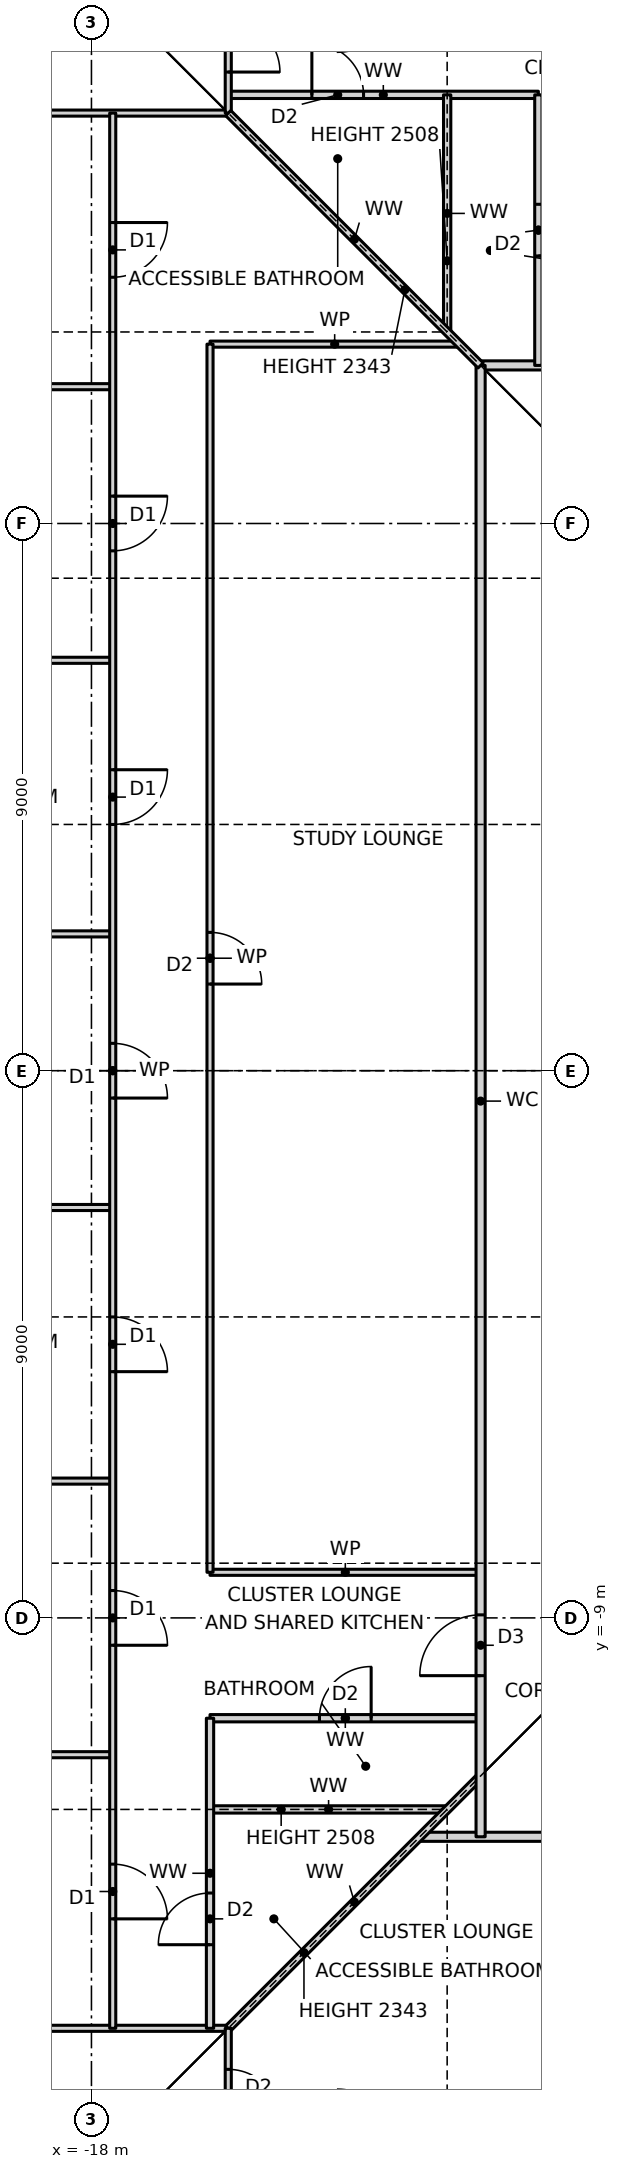
"""IFC4 building model, lengths in metres.
Left out: names, types, materials, properties, quantities, classifications, styles, units other than length and angle.
Written with IfcOpenShell. Run it as: python <this file> out.ifc"""

import sys

from ifc_helpers import new_model, si_unit, direction, frame, frame_2d, origin, place, context, subcontext, project, spatial, rectangle, extrude, element, fill, save


model = new_model("IFC4")
c1 = context("Model", 3, precision=1e-05, world=origin(), true_north=direction((0.0, 1.0)))
c2 = subcontext(c1, "Body", "Model", "MODEL_VIEW")
j1 = project(units=[si_unit("LENGTHUNIT", "METRE"), si_unit("PLANEANGLEUNIT", "RADIAN")], contexts=[c1])
p1 = place(None, origin())
s1 = spatial("IfcSite", under=j1, at=p1, CompositionType="ELEMENT")
p2 = place(p1, origin())
s2 = spatial("IfcBuilding", under=s1, at=p2, CompositionType="ELEMENT")
p3 = place(p2, frame((0.0, 0.0, 22.0)))
s3 = spatial("IfcBuildingStorey", under=s2, at=p3, CompositionType="ELEMENT", Elevation=22.0)
p4 = place(p3, frame((-23.19, -15.75, 0.0), z_axis=(0.0, 0.0, 1.0), x_axis=(1.0, 0.0, 0.0)))
e1 = element("IfcWall", 1, at=p4, inside=s3, PredefinedType="PARTITIONING", context=c2, shape_type="SweptSolid", body=[
    extrude(rectangle(XDim=7.44, YDim=0.1, at=frame_2d((3.72, 0.0))), origin(), (0.0, 0.0, 1.0), 3.27),
])
p5 = place(p3, frame((-12.6, -12.6, 0.0), z_axis=(0.0, 0.0, 1.0), x_axis=(1.0, 0.0, 0.0)))
e2 = element("IfcWall", 2, at=p5, inside=s3, PredefinedType="PARTITIONING", context=c2, shape_type="SweptSolid", body=[
    extrude(rectangle(XDim=25.2, YDim=0.15, at=frame_2d((12.6, 0.0))), origin(), (0.0, 0.0, 1.0), 3.27),
])
p6 = place(p5, frame((21.05, 0.0, 0.0)))
e3 = element("IfcOpeningElement", 3, at=p6, cuts=e2, PredefinedType="OPENING", context=c2, shape_type="SweptSolid", body=[
    extrude(rectangle(XDim=1.0, YDim=2.1, at=frame_2d((0.5, 1.05))), frame((0.0, 0.085, 0.0), z_axis=(0.0, -1.0, 0.0), x_axis=(1.0, 0.0, 0.0)), (0.0, 0.0, 1.0), 0.17),
])
p7 = place(p3, frame((-16.05, -12.15, 0.0), z_axis=(0.0, 0.0, 1.0), x_axis=(1.0, 0.0, 0.0)))
e4 = element("IfcWall", 4, at=p7, inside=s3, PredefinedType="PARTITIONING", context=c2, shape_type="SweptSolid", body=[
    extrude(rectangle(XDim=3.9, YDim=0.12, at=frame_2d((1.95, 0.0))), origin(), (0.0, 0.0, 1.0), 2.508),
])
p8 = place(p3, frame((-23.19, -11.25, 0.0), z_axis=(0.0, 0.0, 1.0), x_axis=(1.0, 0.0, 0.0)))
e5 = element("IfcWall", 5, at=p8, inside=s3, PredefinedType="PARTITIONING", context=c2, shape_type="SweptSolid", body=[
    extrude(rectangle(XDim=5.54, YDim=0.1, at=frame_2d((2.77, 0.0))), origin(), (0.0, 0.0, 1.0), 3.27),
])
p9 = place(p3, frame((-16.05, -10.65, 0.0), z_axis=(0.0, 0.0, 1.0), x_axis=(1.0, 0.0, 0.0)))
e6 = element("IfcWall", 6, at=p9, inside=s3, PredefinedType="PARTITIONING", context=c2, shape_type="SweptSolid", body=[
    extrude(rectangle(XDim=4.45, YDim=0.12, at=frame_2d((2.225, 0.0))), origin(), (0.0, 0.0, 1.0), 3.27),
])
p10 = place(p9, frame((1.8, 0.0, 0.0)))
e7 = element("IfcOpeningElement", 7, at=p10, cuts=e6, PredefinedType="OPENING", context=c2, shape_type="SweptSolid", body=[
    extrude(rectangle(XDim=0.85, YDim=2.1, at=frame_2d((0.425, 1.05))), frame((0.0, 0.07, 0.0), z_axis=(0.0, -1.0, 0.0), x_axis=(1.0, 0.0, 0.0)), (0.0, 0.0, 1.0), 0.14),
])
p11 = place(p3, frame((-16.05, -8.25, 0.0), z_axis=(0.0, 0.0, 1.0), x_axis=(1.0, 0.0, 0.0)))
e8 = element("IfcWall", 8, at=p11, inside=s3, PredefinedType="PARTITIONING", context=c2, shape_type="SweptSolid", body=[
    extrude(rectangle(XDim=4.45, YDim=0.1, at=frame_2d((2.225, 0.0))), origin(), (0.0, 0.0, 1.0), 3.27),
])
for number, where, z_axis, x_axis in (
    (9, (-23.19, -6.75, 0.0), (0.0, 0.0, 1.0), (1.0, 0.0, 0.0)),
    (10, (-23.19, -2.25, 0.0), (0.0, 0.0, 1.0), (1.0, 0.0, 0.0)),
    (11, (-23.19, 2.25, 0.0), (0.0, 0.0, 1.0), (1.0, 0.0, 0.0)),
    (12, (-23.19, 6.75, 0.0), (0.0, 0.0, 1.0), (1.0, 0.0, 0.0)),
    (13, (-23.19, 11.25, 0.0), (0.0, 0.0, 1.0), (1.0, 0.0, 0.0)),
):
    element("IfcWall", number, at=place(p3, frame(where, z_axis=z_axis, x_axis=x_axis)), inside=s3, PredefinedType="PARTITIONING", context=c2, shape_type="SweptSolid", body=[
        extrude(rectangle(XDim=5.54, YDim=0.1, at=frame_2d((2.77, 0.0))), origin(), (0.0, 0.0, 1.0), 3.27),
    ])
p12 = place(p3, frame((-11.6, 11.6, 0.0), z_axis=(0.0, 0.0, 1.0), x_axis=(1.0, 0.0, 0.0)))
e14 = element("IfcWall", 14, at=p12, inside=s3, PredefinedType="PARTITIONING", context=c2, shape_type="SweptSolid", body=[
    extrude(rectangle(XDim=23.2, YDim=0.15, at=frame_2d((11.6, 0.0))), origin(), (0.0, 0.0, 1.0), 3.27),
])
p13 = place(p12, frame((1.65, 0.0, 0.0)))
e15 = element("IfcOpeningElement", 15, at=p13, cuts=e14, PredefinedType="OPENING", context=c2, shape_type="SweptSolid", body=[
    extrude(rectangle(XDim=1.0, YDim=2.1, at=frame_2d((0.5, 1.05))), frame((0.0, 0.085, 0.0), z_axis=(0.0, -1.0, 0.0), x_axis=(1.0, 0.0, 0.0)), (0.0, 0.0, 1.0), 0.17),
])
p14 = place(p3, frame((-16.05, 11.95, 0.0), z_axis=(0.0, 0.0, 1.0), x_axis=(1.0, 0.0, 0.0)))
e16 = element("IfcWall", 16, at=p14, inside=s3, PredefinedType="PARTITIONING", context=c2, shape_type="SweptSolid", body=[
    extrude(rectangle(XDim=4.1, YDim=0.1, at=frame_2d((2.05, 0.0))), origin(), (0.0, 0.0, 1.0), 3.27),
])
p15 = place(p3, frame((-23.19, 15.75, 0.0), z_axis=(0.0, 0.0, 1.0), x_axis=(1.0, 0.0, 0.0)))
e17 = element("IfcWall", 17, at=p15, inside=s3, PredefinedType="PARTITIONING", context=c2, shape_type="SweptSolid", body=[
    extrude(rectangle(XDim=7.44, YDim=0.1, at=frame_2d((3.72, 0.0))), origin(), (0.0, 0.0, 1.0), 3.27),
])
p16 = place(p3, frame((-15.75, 16.05, 0.0), z_axis=(0.0, 0.0, 1.0), x_axis=(1.0, 0.0, 0.0)))
e18 = element("IfcWall", 18, at=p16, inside=s3, PredefinedType="PARTITIONING", context=c2, shape_type="SweptSolid", body=[
    extrude(rectangle(XDim=5.1, YDim=0.12, at=frame_2d((2.55, 0.0))), origin(), (0.0, 0.0, 1.0), 3.27),
])
p17 = place(p16, frame((1.375, 0.0, 0.0)))
e19 = element("IfcOpeningElement", 19, at=p17, cuts=e18, PredefinedType="OPENING", context=c2, shape_type="SweptSolid", body=[
    extrude(rectangle(XDim=0.85, YDim=2.1, at=frame_2d((0.425, 1.05))), frame((0.0, 0.07, 0.0), z_axis=(0.0, -1.0, 0.0), x_axis=(1.0, 0.0, 0.0)), (0.0, 0.0, 1.0), 0.14),
])
p18 = place(p3, frame((-15.75, -15.75, 0.0), z_axis=(0.0, 0.0, 1.0), x_axis=(0.707106781187, 0.707106781187, 0.0)))
e20 = element("IfcWall", 20, at=p18, inside=s3, PredefinedType="PARTITIONING", context=c2, shape_type="SweptSolid", body=[
    extrude(rectangle(XDim=5.869, YDim=0.12, at=frame_2d((2.935, 0.0))), origin(), (0.0, 0.0, 1.0), 2.343),
])
p19 = place(p3, frame((-10.65, 11.6, 0.0), z_axis=(0.0, 0.0, 1.0), x_axis=(0.0, 1.0, 0.0)))
e21 = element("IfcWall", 21, at=p19, inside=s3, PredefinedType="PARTITIONING", context=c2, shape_type="SweptSolid", body=[
    extrude(rectangle(XDim=4.45, YDim=0.12, at=frame_2d((2.225, 0.0))), origin(), (0.0, 0.0, 1.0), 3.27),
])
p20 = place(p19, frame((1.8, 0.0, 0.0)))
e22 = element("IfcOpeningElement", 22, at=p20, cuts=e21, PredefinedType="OPENING", context=c2, shape_type="SweptSolid", body=[
    extrude(rectangle(XDim=0.85, YDim=2.1, at=frame_2d((0.425, 1.05))), frame((0.0, 0.07, 0.0), z_axis=(0.0, -1.0, 0.0), x_axis=(1.0, 0.0, 0.0)), (0.0, 0.0, 1.0), 0.14),
])
p21 = place(p3, frame((-11.6, -12.6, 0.0), z_axis=(0.0, 0.0, 1.0), x_axis=(0.0, 1.0, 0.0)))
e23 = element("IfcWall", 23, at=p21, inside=s3, PredefinedType="PARTITIONING", context=c2, shape_type="SweptSolid", body=[
    extrude(rectangle(XDim=24.2, YDim=0.15, at=frame_2d((12.1, 0.0))), origin(), (0.0, 0.0, 1.0), 3.27),
])
p22 = place(p21, frame((2.65, 0.0, 0.0)))
e24 = element("IfcOpeningElement", 24, at=p22, cuts=e23, PredefinedType="OPENING", context=c2, shape_type="SweptSolid", body=[
    extrude(rectangle(XDim=1.0, YDim=2.1, at=frame_2d((0.5, 1.05))), frame((0.0, 0.085, 0.0), z_axis=(0.0, -1.0, 0.0), x_axis=(1.0, 0.0, 0.0)), (0.0, 0.0, 1.0), 0.17),
])
p23 = place(p3, frame((-12.15, 12.15, 0.0), z_axis=(0.0, 0.0, 1.0), x_axis=(0.0, 1.0, 0.0)))
e25 = element("IfcWall", 25, at=p23, inside=s3, PredefinedType="PARTITIONING", context=c2, shape_type="SweptSolid", body=[
    extrude(rectangle(XDim=3.9, YDim=0.12, at=frame_2d((1.95, 0.0))), origin(), (0.0, 0.0, 1.0), 2.508),
])
p24 = place(p3, frame((-15.75, -23.19, 0.0), z_axis=(0.0, 0.0, 1.0), x_axis=(0.0, 1.0, 0.0)))
e26 = element("IfcWall", 26, at=p24, inside=s3, PredefinedType="PARTITIONING", context=c2, shape_type="SweptSolid", body=[
    extrude(rectangle(XDim=7.44, YDim=0.1, at=frame_2d((3.72, 0.0))), origin(), (0.0, 0.0, 1.0), 3.27),
])
p25 = place(p24, frame((5.915, 0.0, 0.0)))
e27 = element("IfcOpeningElement", 27, at=p25, cuts=e26, PredefinedType="OPENING", context=c2, shape_type="SweptSolid", body=[
    extrude(rectangle(XDim=0.85, YDim=2.1, at=frame_2d((0.425, 1.05))), frame((0.0, 0.06, 0.0), z_axis=(0.0, -1.0, 0.0), x_axis=(1.0, 0.0, 0.0)), (0.0, 0.0, 1.0), 0.12),
])
p26 = place(p3, frame((-15.75, 15.75, 0.0), z_axis=(0.0, 0.0, 1.0), x_axis=(0.0, 1.0, 0.0)))
e28 = element("IfcWall", 28, at=p26, inside=s3, PredefinedType="PARTITIONING", context=c2, shape_type="SweptSolid", body=[
    extrude(rectangle(XDim=7.44, YDim=0.1, at=frame_2d((3.72, 0.0))), origin(), (0.0, 0.0, 1.0), 3.27),
])
p27 = place(p26, frame((0.675, 0.0, 0.0)))
e29 = element("IfcOpeningElement", 29, at=p27, cuts=e28, PredefinedType="OPENING", context=c2, shape_type="SweptSolid", body=[
    extrude(rectangle(XDim=0.85, YDim=2.1, at=frame_2d((0.425, 1.05))), frame((0.0, 0.06, 0.0), z_axis=(0.0, -1.0, 0.0), x_axis=(1.0, 0.0, 0.0)), (0.0, 0.0, 1.0), 0.12),
])
p28 = place(p3, frame((-16.05, -15.75, 0.0), z_axis=(0.0, 0.0, 1.0), x_axis=(0.0, 1.0, 0.0)))
e30 = element("IfcWall", 30, at=p28, inside=s3, PredefinedType="PARTITIONING", context=c2, shape_type="SweptSolid", body=[
    extrude(rectangle(XDim=5.1, YDim=0.12, at=frame_2d((2.55, 0.0))), origin(), (0.0, 0.0, 1.0), 3.27),
])
p29 = place(p28, frame((1.375, 0.0, 0.0)))
e31 = element("IfcOpeningElement", 31, at=p29, cuts=e30, PredefinedType="OPENING", context=c2, shape_type="SweptSolid", body=[
    extrude(rectangle(XDim=0.85, YDim=2.1, at=frame_2d((0.425, 1.05))), frame((0.0, 0.07, 0.0), z_axis=(0.0, -1.0, 0.0), x_axis=(1.0, 0.0, 0.0)), (0.0, 0.0, 1.0), 0.14),
])
p30 = place(p3, frame((-16.05, -8.25, 0.0), z_axis=(0.0, 0.0, 1.0), x_axis=(0.0, 1.0, 0.0)))
e32 = element("IfcWall", 32, at=p30, inside=s3, PredefinedType="PARTITIONING", context=c2, shape_type="SweptSolid", body=[
    extrude(rectangle(XDim=20.2, YDim=0.1, at=frame_2d((10.1, 0.0))), origin(), (0.0, 0.0, 1.0), 3.27),
])
p31 = place(p30, frame((9.675, 0.0, 0.0)))
e33 = element("IfcOpeningElement", 33, at=p31, cuts=e32, PredefinedType="OPENING", context=c2, shape_type="SweptSolid", body=[
    extrude(rectangle(XDim=0.85, YDim=2.1, at=frame_2d((0.425, 1.05))), frame((0.0, 0.06, 0.0), z_axis=(0.0, -1.0, 0.0), x_axis=(1.0, 0.0, 0.0)), (0.0, 0.0, 1.0), 0.12),
])
p32 = place(p3, frame((-17.65, -15.75, 0.0), z_axis=(0.0, 0.0, 1.0), x_axis=(0.0, 1.0, 0.0)))
e34 = element("IfcWall", 34, at=p32, inside=s3, PredefinedType="PARTITIONING", context=c2, shape_type="SweptSolid", body=[
    extrude(rectangle(XDim=31.5, YDim=0.1, at=frame_2d((15.75, 0.0))), origin(), (0.0, 0.0, 1.0), 3.27),
])
p33 = place(p32, frame((28.8, 0.0, 0.0)))
e35 = element("IfcOpeningElement", 35, at=p33, cuts=e34, PredefinedType="OPENING", context=c2, shape_type="SweptSolid", body=[
    extrude(rectangle(XDim=0.9, YDim=2.1, at=frame_2d((0.45, 1.05))), frame((0.0, 0.06, 0.0), z_axis=(0.0, -1.0, 0.0), x_axis=(1.0, 0.0, 0.0)), (0.0, 0.0, 1.0), 0.12),
])
p34 = place(p32, frame((24.3, 0.0, 0.0)))
e36 = element("IfcOpeningElement", 36, at=p34, cuts=e34, PredefinedType="OPENING", context=c2, shape_type="SweptSolid", body=[
    extrude(rectangle(XDim=0.9, YDim=2.1, at=frame_2d((0.45, 1.05))), frame((0.0, 0.06, 0.0), z_axis=(0.0, -1.0, 0.0), x_axis=(1.0, 0.0, 0.0)), (0.0, 0.0, 1.0), 0.12),
])
p35 = place(p32, frame((19.8, 0.0, 0.0)))
e37 = element("IfcOpeningElement", 37, at=p35, cuts=e34, PredefinedType="OPENING", context=c2, shape_type="SweptSolid", body=[
    extrude(rectangle(XDim=0.9, YDim=2.1, at=frame_2d((0.45, 1.05))), frame((0.0, 0.06, 0.0), z_axis=(0.0, -1.0, 0.0), x_axis=(1.0, 0.0, 0.0)), (0.0, 0.0, 1.0), 0.12),
])
p36 = place(p32, frame((15.3, 0.0, 0.0)))
e38 = element("IfcOpeningElement", 38, at=p36, cuts=e34, PredefinedType="OPENING", context=c2, shape_type="SweptSolid", body=[
    extrude(rectangle(XDim=0.9, YDim=2.1, at=frame_2d((0.45, 1.05))), frame((0.0, 0.06, 0.0), z_axis=(0.0, -1.0, 0.0), x_axis=(1.0, 0.0, 0.0)), (0.0, 0.0, 1.0), 0.12),
])
p37 = place(p32, frame((10.8, 0.0, 0.0)))
e39 = element("IfcOpeningElement", 39, at=p37, cuts=e34, PredefinedType="OPENING", context=c2, shape_type="SweptSolid", body=[
    extrude(rectangle(XDim=0.9, YDim=2.1, at=frame_2d((0.45, 1.05))), frame((0.0, 0.06, 0.0), z_axis=(0.0, -1.0, 0.0), x_axis=(1.0, 0.0, 0.0)), (0.0, 0.0, 1.0), 0.12),
])
p38 = place(p32, frame((6.3, 0.0, 0.0)))
e40 = element("IfcOpeningElement", 40, at=p38, cuts=e34, PredefinedType="OPENING", context=c2, shape_type="SweptSolid", body=[
    extrude(rectangle(XDim=0.9, YDim=2.1, at=frame_2d((0.45, 1.05))), frame((0.0, 0.06, 0.0), z_axis=(0.0, -1.0, 0.0), x_axis=(1.0, 0.0, 0.0)), (0.0, 0.0, 1.0), 0.12),
])
p39 = place(p32, frame((1.8, 0.0, 0.0)))
e41 = element("IfcOpeningElement", 41, at=p39, cuts=e34, PredefinedType="OPENING", context=c2, shape_type="SweptSolid", body=[
    extrude(rectangle(XDim=0.9, YDim=2.1, at=frame_2d((0.45, 1.05))), frame((0.0, 0.06, 0.0), z_axis=(0.0, -1.0, 0.0), x_axis=(1.0, 0.0, 0.0)), (0.0, 0.0, 1.0), 0.12),
])
p40 = place(p3, frame((-11.6, 11.6, 0.0), z_axis=(0.0, 0.0, 1.0), x_axis=(-0.707106781187, 0.707106781187, 0.0)))
e42 = element("IfcWall", 42, at=p40, inside=s3, PredefinedType="PARTITIONING", context=c2, shape_type="SweptSolid", body=[
    extrude(rectangle(XDim=5.869, YDim=0.12, at=frame_2d((2.935, 0.0))), origin(), (0.0, 0.0, 1.0), 2.343),
])
p41 = place(p20, frame((0.85, 0.0, 0.0), z_axis=(0.0, 0.0, 1.0), x_axis=(-1.0, 0.0, 0.0)))
e43 = element("IfcDoor", 43, at=p41, inside=s3, OperationType="SINGLE_SWING_RIGHT", PredefinedType="DOOR", context=c2, shape_type="SweptSolid", body=[
    extrude(rectangle(XDim=0.85, YDim=2.1, at=frame_2d((0.425, 1.05))), frame((0.0, 0.025, 0.0), z_axis=(0.0, -1.0, 0.0), x_axis=(1.0, 0.0, 0.0)), (0.0, 0.0, 1.0), 0.05),
])
fill(e22, e43)
p42 = place(p17, origin())
e44 = element("IfcDoor", 44, at=p42, inside=s3, OperationType="SINGLE_SWING_LEFT", PredefinedType="DOOR", context=c2, shape_type="SweptSolid", body=[
    extrude(rectangle(XDim=0.85, YDim=2.1, at=frame_2d((0.425, 1.05))), frame((0.0, 0.025, 0.0), z_axis=(0.0, -1.0, 0.0), x_axis=(1.0, 0.0, 0.0)), (0.0, 0.0, 1.0), 0.05),
])
fill(e19, e44)
p43 = place(p33, frame((0.9, 0.0, 0.0), z_axis=(0.0, 0.0, 1.0), x_axis=(-1.0, 0.0, 0.0)))
e45 = element("IfcDoor", 45, at=p43, inside=s3, OperationType="SINGLE_SWING_LEFT", PredefinedType="DOOR", context=c2, shape_type="SweptSolid", body=[
    extrude(rectangle(XDim=0.9, YDim=2.1, at=frame_2d((0.45, 1.05))), frame((0.0, 0.025, 0.0), z_axis=(0.0, -1.0, 0.0), x_axis=(1.0, 0.0, 0.0)), (0.0, 0.0, 1.0), 0.05),
])
fill(e35, e45)
p44 = place(p34, frame((0.9, 0.0, 0.0), z_axis=(0.0, 0.0, 1.0), x_axis=(-1.0, 0.0, 0.0)))
e46 = element("IfcDoor", 46, at=p44, inside=s3, OperationType="SINGLE_SWING_LEFT", PredefinedType="DOOR", context=c2, shape_type="SweptSolid", body=[
    extrude(rectangle(XDim=0.9, YDim=2.1, at=frame_2d((0.45, 1.05))), frame((0.0, 0.025, 0.0), z_axis=(0.0, -1.0, 0.0), x_axis=(1.0, 0.0, 0.0)), (0.0, 0.0, 1.0), 0.05),
])
fill(e36, e46)
p45 = place(p35, frame((0.9, 0.0, 0.0), z_axis=(0.0, 0.0, 1.0), x_axis=(-1.0, 0.0, 0.0)))
e47 = element("IfcDoor", 47, at=p45, inside=s3, OperationType="SINGLE_SWING_LEFT", PredefinedType="DOOR", context=c2, shape_type="SweptSolid", body=[
    extrude(rectangle(XDim=0.9, YDim=2.1, at=frame_2d((0.45, 1.05))), frame((0.0, 0.025, 0.0), z_axis=(0.0, -1.0, 0.0), x_axis=(1.0, 0.0, 0.0)), (0.0, 0.0, 1.0), 0.05),
])
fill(e37, e47)
p46 = place(p36, frame((0.9, 0.0, 0.0), z_axis=(0.0, 0.0, 1.0), x_axis=(-1.0, 0.0, 0.0)))
e48 = element("IfcDoor", 48, at=p46, inside=s3, OperationType="SINGLE_SWING_RIGHT", PredefinedType="DOOR", context=c2, shape_type="SweptSolid", body=[
    extrude(rectangle(XDim=0.9, YDim=2.1, at=frame_2d((0.45, 1.05))), frame((0.0, 0.025, 0.0), z_axis=(0.0, -1.0, 0.0), x_axis=(1.0, 0.0, 0.0)), (0.0, 0.0, 1.0), 0.05),
])
fill(e38, e48)
p47 = place(p37, frame((0.9, 0.0, 0.0), z_axis=(0.0, 0.0, 1.0), x_axis=(-1.0, 0.0, 0.0)))
e49 = element("IfcDoor", 49, at=p47, inside=s3, OperationType="SINGLE_SWING_RIGHT", PredefinedType="DOOR", context=c2, shape_type="SweptSolid", body=[
    extrude(rectangle(XDim=0.9, YDim=2.1, at=frame_2d((0.45, 1.05))), frame((0.0, 0.025, 0.0), z_axis=(0.0, -1.0, 0.0), x_axis=(1.0, 0.0, 0.0)), (0.0, 0.0, 1.0), 0.05),
])
fill(e39, e49)
p48 = place(p38, frame((0.9, 0.0, 0.0), z_axis=(0.0, 0.0, 1.0), x_axis=(-1.0, 0.0, 0.0)))
e50 = element("IfcDoor", 50, at=p48, inside=s3, OperationType="SINGLE_SWING_RIGHT", PredefinedType="DOOR", context=c2, shape_type="SweptSolid", body=[
    extrude(rectangle(XDim=0.9, YDim=2.1, at=frame_2d((0.45, 1.05))), frame((0.0, 0.025, 0.0), z_axis=(0.0, -1.0, 0.0), x_axis=(1.0, 0.0, 0.0)), (0.0, 0.0, 1.0), 0.05),
])
fill(e40, e50)
p49 = place(p39, frame((0.9, 0.0, 0.0), z_axis=(0.0, 0.0, 1.0), x_axis=(-1.0, 0.0, 0.0)))
e51 = element("IfcDoor", 51, at=p49, inside=s3, OperationType="SINGLE_SWING_RIGHT", PredefinedType="DOOR", context=c2, shape_type="SweptSolid", body=[
    extrude(rectangle(XDim=0.9, YDim=2.1, at=frame_2d((0.45, 1.05))), frame((0.0, 0.025, 0.0), z_axis=(0.0, -1.0, 0.0), x_axis=(1.0, 0.0, 0.0)), (0.0, 0.0, 1.0), 0.05),
])
fill(e41, e51)
p50 = place(p22, origin())
e52 = element("IfcDoor", 52, at=p50, inside=s3, OperationType="SINGLE_SWING_LEFT", PredefinedType="DOOR", context=c2, shape_type="SweptSolid", body=[
    extrude(rectangle(XDim=1.0, YDim=2.1, at=frame_2d((0.5, 1.05))), frame((0.0, 0.025, 0.0), z_axis=(0.0, -1.0, 0.0), x_axis=(1.0, 0.0, 0.0)), (0.0, 0.0, 1.0), 0.05),
])
fill(e24, e52)
p51 = place(p31, frame((0.85, 0.0, 0.0), z_axis=(0.0, 0.0, 1.0), x_axis=(-1.0, 0.0, 0.0)))
e53 = element("IfcDoor", 53, at=p51, inside=s3, OperationType="SINGLE_SWING_RIGHT", PredefinedType="DOOR", context=c2, shape_type="SweptSolid", body=[
    extrude(rectangle(XDim=0.85, YDim=2.1, at=frame_2d((0.425, 1.05))), frame((0.0, 0.025, 0.0), z_axis=(0.0, -1.0, 0.0), x_axis=(1.0, 0.0, 0.0)), (0.0, 0.0, 1.0), 0.05),
])
fill(e33, e53)
p52 = place(p10, origin())
e54 = element("IfcDoor", 54, at=p52, inside=s3, OperationType="SINGLE_SWING_RIGHT", PredefinedType="DOOR", context=c2, shape_type="SweptSolid", body=[
    extrude(rectangle(XDim=0.85, YDim=2.1, at=frame_2d((0.425, 1.05))), frame((0.0, 0.025, 0.0), z_axis=(0.0, -1.0, 0.0), x_axis=(1.0, 0.0, 0.0)), (0.0, 0.0, 1.0), 0.05),
])
fill(e7, e54)
p53 = place(p29, origin())
e55 = element("IfcDoor", 55, at=p53, inside=s3, OperationType="SINGLE_SWING_LEFT", PredefinedType="DOOR", context=c2, shape_type="SweptSolid", body=[
    extrude(rectangle(XDim=0.85, YDim=2.1, at=frame_2d((0.425, 1.05))), frame((0.0, 0.025, 0.0), z_axis=(0.0, -1.0, 0.0), x_axis=(1.0, 0.0, 0.0)), (0.0, 0.0, 1.0), 0.05),
])
fill(e31, e55)
p54 = place(p25, frame((0.85, 0.0, 0.0), z_axis=(0.0, 0.0, 1.0), x_axis=(-1.0, 0.0, 0.0)))
e56 = element("IfcDoor", 56, at=p54, inside=s3, OperationType="SINGLE_SWING_RIGHT", PredefinedType="DOOR", context=c2, shape_type="SweptSolid", body=[
    extrude(rectangle(XDim=0.85, YDim=2.1, at=frame_2d((0.425, 1.05))), frame((0.0, 0.025, 0.0), z_axis=(0.0, -1.0, 0.0), x_axis=(1.0, 0.0, 0.0)), (0.0, 0.0, 1.0), 0.05),
])
fill(e27, e56)
p55 = place(p27, frame((0.85, 0.0, 0.0), z_axis=(0.0, 0.0, 1.0), x_axis=(-1.0, 0.0, 0.0)))
e57 = element("IfcDoor", 57, at=p55, inside=s3, OperationType="SINGLE_SWING_RIGHT", PredefinedType="DOOR", context=c2, shape_type="SweptSolid", body=[
    extrude(rectangle(XDim=0.85, YDim=2.1, at=frame_2d((0.425, 1.05))), frame((0.0, 0.025, 0.0), z_axis=(0.0, -1.0, 0.0), x_axis=(1.0, 0.0, 0.0)), (0.0, 0.0, 1.0), 0.05),
])
fill(e29, e57)
save(model, sys.argv[1])
